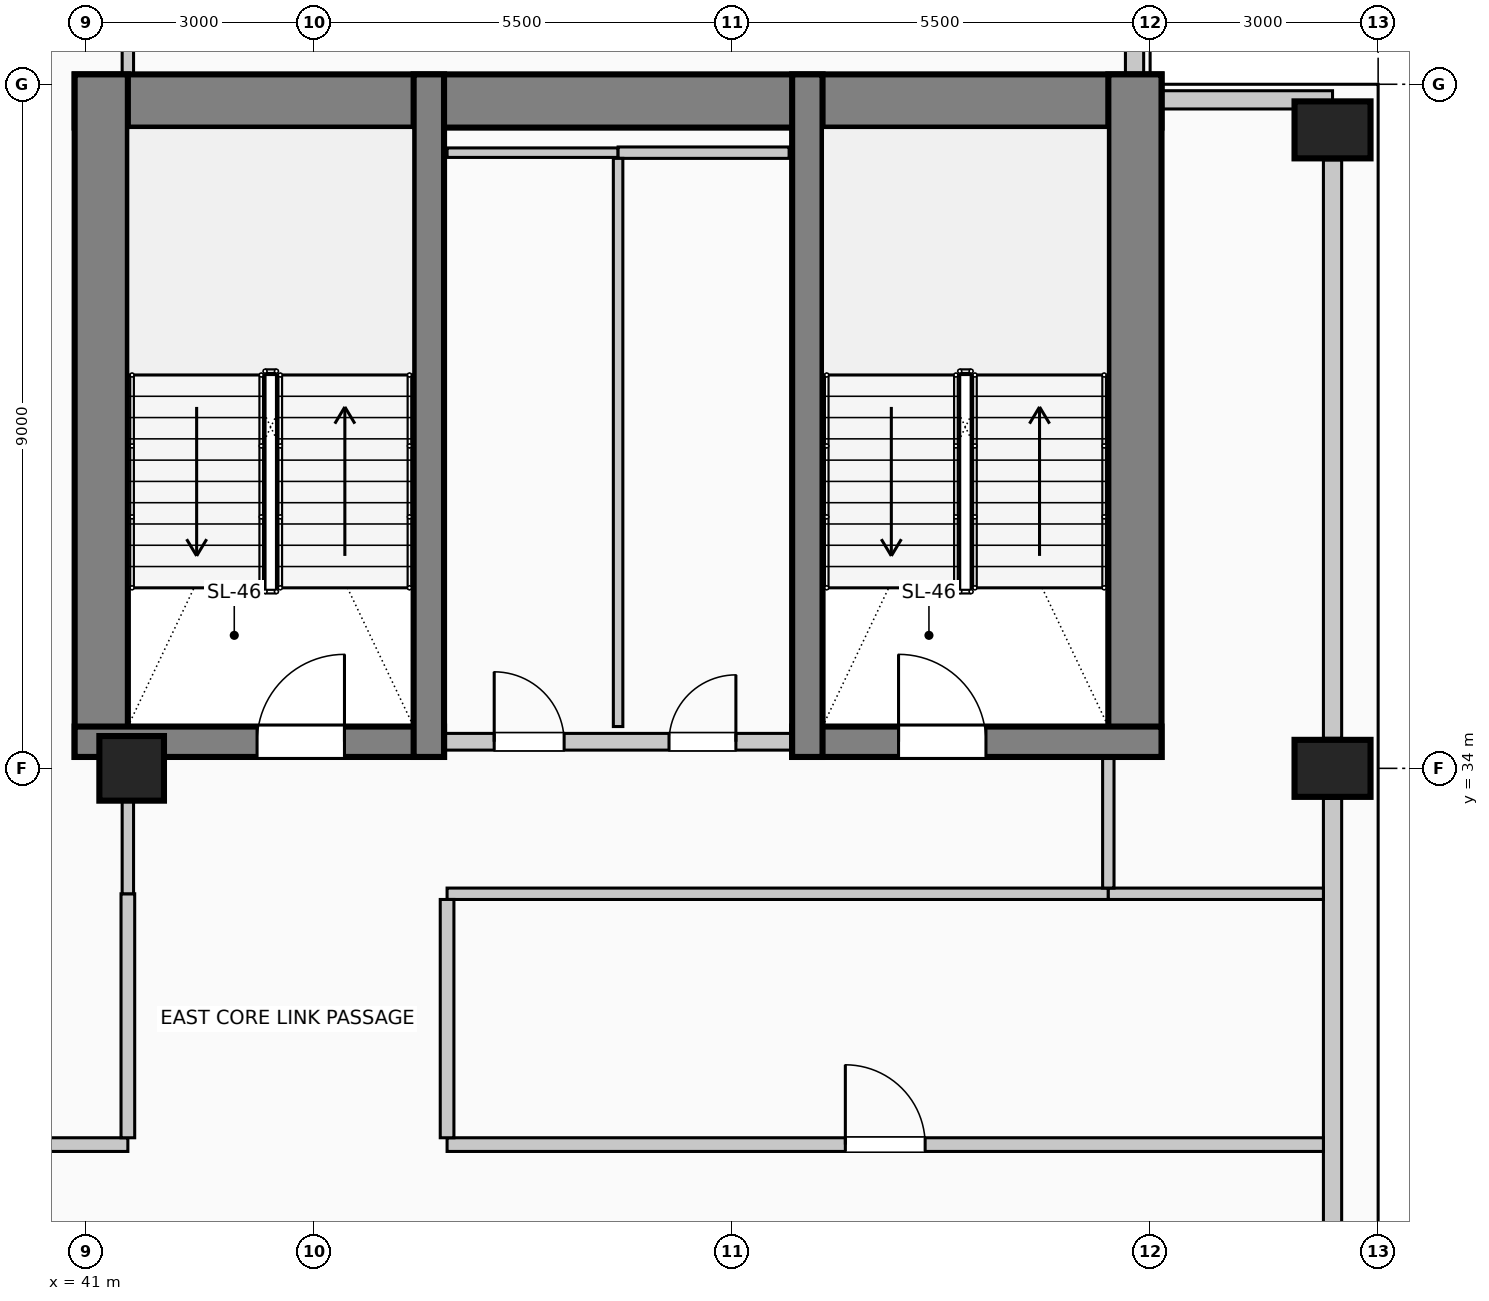
"""IFC4 building model, lengths in metres.
Left out: names, types, materials, properties, quantities, classifications, styles, units other than length and angle.
Written with IfcOpenShell. Run it as: python <this file> out.ifc"""

import sys

from ifc_helpers import new_model, si_unit, direction, frame, frame_2d, origin, origin_2d, place, context, subcontext, project, spatial, rectangle, circle, extrude, element, fill, save


model = new_model("IFC4")
c1 = context("Model", 3, precision=1e-05, world=origin(), true_north=direction((0.0, 1.0)))
c2 = subcontext(c1, "Body", "Model", "MODEL_VIEW")
j1 = project(units=[si_unit("LENGTHUNIT", "METRE"), si_unit("PLANEANGLEUNIT", "RADIAN")], contexts=[c1])
p1 = place(None, origin())
s1 = spatial("IfcSite", under=j1, at=p1, CompositionType="ELEMENT")
p2 = place(p1, origin())
s2 = spatial("IfcBuilding", under=s1, at=p2, CompositionType="ELEMENT")
p3 = place(p2, frame((0.0, 0.0, 248.6)))
s3 = spatial("IfcBuildingStorey", under=s2, at=p3, CompositionType="ELEMENT", Elevation=248.6)
p4 = place(p3, frame((40.85, 42.78, 0.0), z_axis=(0.0, 0.0, 1.0), x_axis=(1.0, 0.0, 0.0)))
e1 = element("IfcWall", 1, at=p4, inside=s3, PredefinedType="SHEAR", context=c2, shape_type="SweptSolid", body=[
    extrude(rectangle(XDim=14.3, YDim=0.7, at=frame_2d((7.15, 0.0))), origin(), (0.0, 0.0, 1.0), 4.0),
])
for number, where, z_axis, x_axis in (
    (2, (41.2, 34.15, 0.0), (0.0, 0.0, 1.0), (0.0, 1.0, 0.0)),
    (3, (54.8, 34.15, 0.0), (0.0, 0.0, 1.0), (0.0, 1.0, 0.0)),
):
    element("IfcWall", number, at=place(p3, frame(where, z_axis=z_axis, x_axis=x_axis)), inside=s3, PredefinedType="SHEAR", context=c2, shape_type="SweptSolid", body=[
        extrude(rectangle(XDim=8.98, YDim=0.7, at=frame_2d((4.49, 0.0))), origin(), (0.0, 0.0, 1.0), 4.0),
    ])
p5 = place(p3, frame((40.85, 34.35, 0.0), z_axis=(0.0, 0.0, 1.0), x_axis=(1.0, 0.0, 0.0)))
e4 = element("IfcWall", 4, at=p5, inside=s3, PredefinedType="SHEAR", context=c2, shape_type="SweptSolid", body=[
    extrude(rectangle(XDim=4.86, YDim=0.4, at=frame_2d((2.43, 0.0))), origin(), (0.0, 0.0, 1.0), 4.0),
])
p6 = place(p5, frame((2.4, 0.0, 0.0)))
e5 = element("IfcOpeningElement", 5, at=p6, cuts=e4, PredefinedType="OPENING", context=c2, shape_type="SweptSolid", body=[
    extrude(rectangle(XDim=1.15, YDim=2.2, at=frame_2d((0.575, 1.1))), frame((0.0, 0.21, 0.0), z_axis=(0.0, -1.0, 0.0), x_axis=(1.0, 0.0, 0.0)), (0.0, 0.0, 1.0), 0.42),
])
p7 = place(p3, frame((45.51, 34.15, 0.0), z_axis=(0.0, 0.0, 1.0), x_axis=(0.0, 1.0, 0.0)))
e6 = element("IfcWall", 6, at=p7, inside=s3, PredefinedType="SHEAR", context=c2, shape_type="SweptSolid", body=[
    extrude(rectangle(XDim=8.98, YDim=0.4, at=frame_2d((4.49, 0.0))), origin(), (0.0, 0.0, 1.0), 4.0),
])
p8 = place(p3, frame((50.29, 34.35, 0.0), z_axis=(0.0, 0.0, 1.0), x_axis=(1.0, 0.0, 0.0)))
e7 = element("IfcWall", 7, at=p8, inside=s3, PredefinedType="SHEAR", context=c2, shape_type="SweptSolid", body=[
    extrude(rectangle(XDim=4.86, YDim=0.4, at=frame_2d((2.43, 0.0))), origin(), (0.0, 0.0, 1.0), 4.0),
])
p9 = place(p8, frame((1.4, 0.0, 0.0)))
e8 = element("IfcOpeningElement", 8, at=p9, cuts=e7, PredefinedType="OPENING", context=c2, shape_type="SweptSolid", body=[
    extrude(rectangle(XDim=1.15, YDim=2.2, at=frame_2d((0.575, 1.1))), frame((0.0, 0.21, 0.0), z_axis=(0.0, -1.0, 0.0), x_axis=(1.0, 0.0, 0.0)), (0.0, 0.0, 1.0), 0.42),
])
p10 = place(p3, frame((50.49, 34.15, 0.0), z_axis=(0.0, 0.0, 1.0), x_axis=(0.0, 1.0, 0.0)))
e9 = element("IfcWall", 9, at=p10, inside=s3, PredefinedType="SHEAR", context=c2, shape_type="SweptSolid", body=[
    extrude(rectangle(XDim=8.98, YDim=0.4, at=frame_2d((4.49, 0.0))), origin(), (0.0, 0.0, 1.0), 4.0),
])
for number, where, z_axis, x_axis in (
    (10, (57.4, 34.0, 0.0), (0.0, 0.0, 1.0), (0.0, 1.0, 0.0)),
    (11, (57.4, 42.4, 0.0), (0.0, 0.0, 1.0), (0.0, 1.0, 0.0)),
):
    element("IfcColumn", number, at=place(p3, frame(where, z_axis=z_axis, x_axis=x_axis)), inside=s3, PredefinedType="COLUMN", context=c2, shape_type="SweptSolid", body=[
        extrude(rectangle(XDim=0.75, YDim=1.0, at=origin_2d()), origin(), (0.0, 0.0, 1.0), 4.0),
    ])
p11 = place(p3, frame((41.6, 34.0, 0.0), z_axis=(0.0, 0.0, 1.0), x_axis=(1.0, 0.0, 0.0)))
e12 = element("IfcColumn", 12, at=p11, inside=s3, PredefinedType="COLUMN", context=c2, shape_type="SweptSolid", body=[
    extrude(circle(Radius=0.425, at=origin_2d()), origin(), (0.0, 0.0, 1.0), 4.0),
])
p12 = place(p3, frame((57.4, 33.605, 0.0), z_axis=(0.0, 0.0, 1.0), x_axis=(0.0, -1.0, 0.0)))
e13 = element("IfcWall", 13, at=p12, inside=s3, PredefinedType="SOLIDWALL", context=c2, shape_type="SweptSolid", body=[
    extrude(rectangle(XDim=7.21, YDim=0.24, at=frame_2d((3.605, 0.0))), origin(), (0.0, 0.0, 1.0), 3.0),
])
p13 = place(p3, frame((57.4, 42.005, 0.0), z_axis=(0.0, 0.0, 1.0), x_axis=(0.0, -1.0, 0.0)))
e14 = element("IfcWall", 14, at=p13, inside=s3, PredefinedType="SOLIDWALL", context=c2, shape_type="SweptSolid", body=[
    extrude(rectangle(XDim=7.61, YDim=0.24, at=frame_2d((3.805, 0.0))), origin(), (0.0, 0.0, 1.0), 3.0),
])
p14 = place(p3, frame((54.795, 45.4, 0.0), z_axis=(0.0, 0.0, 1.0), x_axis=(0.0, -1.0, 0.0)))
e15 = element("IfcWall", 15, at=p14, inside=s3, PredefinedType="SOLIDWALL", context=c2, shape_type="SweptSolid", body=[
    extrude(rectangle(XDim=2.265, YDim=0.24, at=frame_2d((1.132, 0.0))), origin(), (0.0, 0.0, 1.0), 3.75),
])
p15 = place(p3, frame((55.155, 42.795, 0.0), z_axis=(0.0, 0.0, 1.0), x_axis=(1.0, 0.0, 0.0)))
e16 = element("IfcWall", 16, at=p15, inside=s3, PredefinedType="SOLIDWALL", context=c2, shape_type="SweptSolid", body=[
    extrude(rectangle(XDim=2.245, YDim=0.24, at=frame_2d((1.123, 0.0))), origin(), (0.0, 0.0, 1.0), 3.75),
])
p16 = place(p3, frame((45.72, 34.35, 0.0), z_axis=(0.0, 0.0, 1.0), x_axis=(1.0, 0.0, 0.0)))
e17 = element("IfcWall", 17, at=p16, inside=s3, PredefinedType="PARTITIONING", context=c2, shape_type="SweptSolid", body=[
    extrude(rectangle(XDim=4.56, YDim=0.22, at=frame_2d((2.28, 0.0))), origin(), (0.0, 0.0, 1.0), 3.75),
])
p17 = place(p16, frame((0.65, 0.0, 0.0)))
e18 = element("IfcOpeningElement", 18, at=p17, cuts=e17, PredefinedType="OPENING", context=c2, shape_type="SweptSolid", body=[
    extrude(rectangle(XDim=0.92, YDim=2.1, at=frame_2d((0.46, 1.05))), frame((0.0, 0.12, 0.0), z_axis=(0.0, -1.0, 0.0), x_axis=(1.0, 0.0, 0.0)), (0.0, 0.0, 1.0), 0.24),
])
p18 = place(p16, frame((2.95, 0.0, 0.0)))
e19 = element("IfcOpeningElement", 19, at=p18, cuts=e17, PredefinedType="OPENING", context=c2, shape_type="SweptSolid", body=[
    extrude(rectangle(XDim=0.88, YDim=2.1, at=frame_2d((0.44, 1.05))), frame((0.0, 0.12, 0.0), z_axis=(0.0, -1.0, 0.0), x_axis=(1.0, 0.0, 0.0)), (0.0, 0.0, 1.0), 0.24),
])
p19 = place(p3, frame((30.43, 29.05, 0.0), z_axis=(0.0, 0.0, 1.0), x_axis=(1.0, 0.0, 0.0)))
e20 = element("IfcWall", 20, at=p19, inside=s3, PredefinedType="PARTITIONING", context=c2, shape_type="SweptSolid", body=[
    extrude(rectangle(XDim=11.12, YDim=0.18, at=frame_2d((5.56, 0.0))), origin(), (0.0, 0.0, 1.0), 3.75),
])
p20 = place(p19, frame((5.085, 0.0, 0.0)))
e21 = element("IfcOpeningElement", 21, at=p20, cuts=e20, PredefinedType="OPENING", context=c2, shape_type="SweptSolid", body=[
    extrude(rectangle(XDim=0.95, YDim=2.15, at=frame_2d((0.475, 1.075))), frame((0.0, 0.1, 0.0), z_axis=(0.0, -1.0, 0.0), x_axis=(1.0, 0.0, 0.0)), (0.0, 0.0, 1.0), 0.2),
])
p21 = place(p3, frame((45.75, 29.05, 0.0), z_axis=(0.0, 0.0, 1.0), x_axis=(1.0, 0.0, 0.0)))
e22 = element("IfcWall", 22, at=p21, inside=s3, PredefinedType="PARTITIONING", context=c2, shape_type="SweptSolid", body=[
    extrude(rectangle(XDim=11.53, YDim=0.18, at=frame_2d((5.765, 0.0))), origin(), (0.0, 0.0, 1.0), 3.75),
])
p22 = place(p21, frame((5.24, 0.0, 0.0)))
e23 = element("IfcOpeningElement", 23, at=p22, cuts=e22, PredefinedType="OPENING", context=c2, shape_type="SweptSolid", body=[
    extrude(rectangle(XDim=1.05, YDim=2.15, at=frame_2d((0.525, 1.075))), frame((0.0, 0.1, 0.0), z_axis=(0.0, -1.0, 0.0), x_axis=(1.0, 0.0, 0.0)), (0.0, 0.0, 1.0), 0.2),
])
p23 = place(p3, frame((45.75, 32.35, 0.0), z_axis=(0.0, 0.0, 1.0), x_axis=(1.0, 0.0, 0.0)))
e24 = element("IfcWall", 24, at=p23, inside=s3, PredefinedType="PARTITIONING", context=c2, shape_type="SweptSolid", body=[
    extrude(rectangle(XDim=8.7, YDim=0.15, at=frame_2d((4.35, 0.0))), origin(), (0.0, 0.0, 1.0), 3.75),
])
p24 = place(p3, frame((54.45, 32.35, 0.0), z_axis=(0.0, 0.0, 1.0), x_axis=(1.0, 0.0, 0.0)))
e25 = element("IfcWall", 25, at=p24, inside=s3, PredefinedType="PARTITIONING", context=c2, shape_type="SweptSolid", body=[
    extrude(rectangle(XDim=2.83, YDim=0.15, at=frame_2d((1.415, 0.0))), origin(), (0.0, 0.0, 1.0), 3.75),
])
p25 = place(p3, frame((45.75, 42.1, 0.0), z_axis=(0.0, 0.0, 1.0), x_axis=(1.0, 0.0, 0.0)))
e26 = element("IfcWall", 26, at=p25, inside=s3, PredefinedType="PARTITIONING", context=c2, shape_type="SweptSolid", body=[
    extrude(rectangle(XDim=2.25, YDim=0.125, at=frame_2d((1.125, 0.0))), origin(), (0.0, 0.0, 1.0), 3.75),
])
p26 = place(p3, frame((48.0, 42.1, 0.0), z_axis=(0.0, 0.0, 1.0), x_axis=(1.0, 0.0, 0.0)))
e27 = element("IfcWall", 27, at=p26, inside=s3, PredefinedType="PARTITIONING", context=c2, shape_type="SweptSolid", body=[
    extrude(rectangle(XDim=2.25, YDim=0.15, at=frame_2d((1.125, 0.0))), origin(), (0.0, 0.0, 1.0), 3.75),
])
p27 = place(p3, frame((41.55, 29.14, 0.0), z_axis=(0.0, 0.0, 1.0), x_axis=(0.0, 1.0, 0.0)))
e28 = element("IfcWall", 28, at=p27, inside=s3, PredefinedType="PARTITIONING", context=c2, shape_type="SweptSolid", body=[
    extrude(rectangle(XDim=3.21, YDim=0.18, at=frame_2d((1.605, 0.0))), origin(), (0.0, 0.0, 1.0), 3.195),
])
p28 = place(p3, frame((41.55, 32.35, 0.0), z_axis=(0.0, 0.0, 1.0), x_axis=(0.0, 1.0, 0.0)))
e29 = element("IfcWall", 29, at=p28, inside=s3, PredefinedType="PARTITIONING", context=c2, shape_type="SweptSolid", body=[
    extrude(rectangle(XDim=1.225, YDim=0.15, at=frame_2d((0.612, 0.0))), origin(), (0.0, 0.0, 1.0), 3.195),
])
p29 = place(p3, frame((41.55, 43.13, 0.0), z_axis=(0.0, 0.0, 1.0), x_axis=(0.0, 1.0, 0.0)))
e30 = element("IfcWall", 30, at=p29, inside=s3, PredefinedType="PARTITIONING", context=c2, shape_type="SweptSolid", body=[
    extrude(rectangle(XDim=1.62, YDim=0.15, at=frame_2d((0.81, 0.0))), origin(), (0.0, 0.0, 1.0), 3.75),
])
p30 = place(p3, frame((45.75, 29.14, 0.0), z_axis=(0.0, 0.0, 1.0), x_axis=(0.0, 1.0, 0.0)))
e31 = element("IfcWall", 31, at=p30, inside=s3, PredefinedType="PARTITIONING", context=c2, shape_type="SweptSolid", body=[
    extrude(rectangle(XDim=3.135, YDim=0.18, at=frame_2d((1.567, 0.0))), origin(), (0.0, 0.0, 1.0), 3.75),
])
p31 = place(p3, frame((48.0, 34.55, 0.0), z_axis=(0.0, 0.0, 1.0), x_axis=(0.0, 1.0, 0.0)))
e32 = element("IfcWall", 32, at=p31, inside=s3, PredefinedType="PARTITIONING", context=c2, shape_type="SweptSolid", body=[
    extrude(rectangle(XDim=7.475, YDim=0.125, at=frame_2d((3.737, 0.0))), origin(), (0.0, 0.0, 1.0), 3.75),
])
p32 = place(p3, frame((54.45, 32.425, 0.0), z_axis=(0.0, 0.0, 1.0), x_axis=(0.0, 1.0, 0.0)))
e33 = element("IfcWall", 33, at=p32, inside=s3, PredefinedType="PARTITIONING", context=c2, shape_type="SweptSolid", body=[
    extrude(rectangle(XDim=1.725, YDim=0.15, at=frame_2d((0.862, 0.0))), origin(), (0.0, 0.0, 1.0), 3.75),
])
p33 = place(p6, origin())
e34 = element("IfcDoor", 34, at=p33, inside=s3, OperationType="SINGLE_SWING_RIGHT", PredefinedType="DOOR", context=c2, shape_type="SweptSolid", body=[
    extrude(rectangle(XDim=1.15, YDim=2.2, at=frame_2d((0.575, 1.1))), frame((0.0, 0.025, 0.0), z_axis=(0.0, -1.0, 0.0), x_axis=(1.0, 0.0, 0.0)), (0.0, 0.0, 1.0), 0.05),
])
fill(e5, e34)
p34 = place(p17, origin())
e35 = element("IfcDoor", 35, at=p34, inside=s3, OperationType="SINGLE_SWING_LEFT", PredefinedType="DOOR", context=c2, shape_type="SweptSolid", body=[
    extrude(rectangle(XDim=0.92, YDim=2.1, at=frame_2d((0.46, 1.05))), frame((0.0, 0.025, 0.0), z_axis=(0.0, -1.0, 0.0), x_axis=(1.0, 0.0, 0.0)), (0.0, 0.0, 1.0), 0.05),
])
fill(e18, e35)
p35 = place(p18, origin())
e36 = element("IfcDoor", 36, at=p35, inside=s3, OperationType="SINGLE_SWING_RIGHT", PredefinedType="DOOR", context=c2, shape_type="SweptSolid", body=[
    extrude(rectangle(XDim=0.88, YDim=2.1, at=frame_2d((0.44, 1.05))), frame((0.0, 0.025, 0.0), z_axis=(0.0, -1.0, 0.0), x_axis=(1.0, 0.0, 0.0)), (0.0, 0.0, 1.0), 0.05),
])
fill(e19, e36)
p36 = place(p9, origin())
e37 = element("IfcDoor", 37, at=p36, inside=s3, OperationType="SINGLE_SWING_LEFT", PredefinedType="DOOR", context=c2, shape_type="SweptSolid", body=[
    extrude(rectangle(XDim=1.15, YDim=2.2, at=frame_2d((0.575, 1.1))), frame((0.0, 0.025, 0.0), z_axis=(0.0, -1.0, 0.0), x_axis=(1.0, 0.0, 0.0)), (0.0, 0.0, 1.0), 0.05),
])
fill(e8, e37)
p37 = place(p22, origin())
e38 = element("IfcDoor", 38, at=p37, inside=s3, OperationType="SINGLE_SWING_LEFT", PredefinedType="DOOR", context=c2, shape_type="SweptSolid", body=[
    extrude(rectangle(XDim=1.05, YDim=2.15, at=frame_2d((0.525, 1.075))), frame((0.0, 0.025, 0.0), z_axis=(0.0, -1.0, 0.0), x_axis=(1.0, 0.0, 0.0)), (0.0, 0.0, 1.0), 0.05),
])
fill(e23, e38)
save(model, sys.argv[1])
